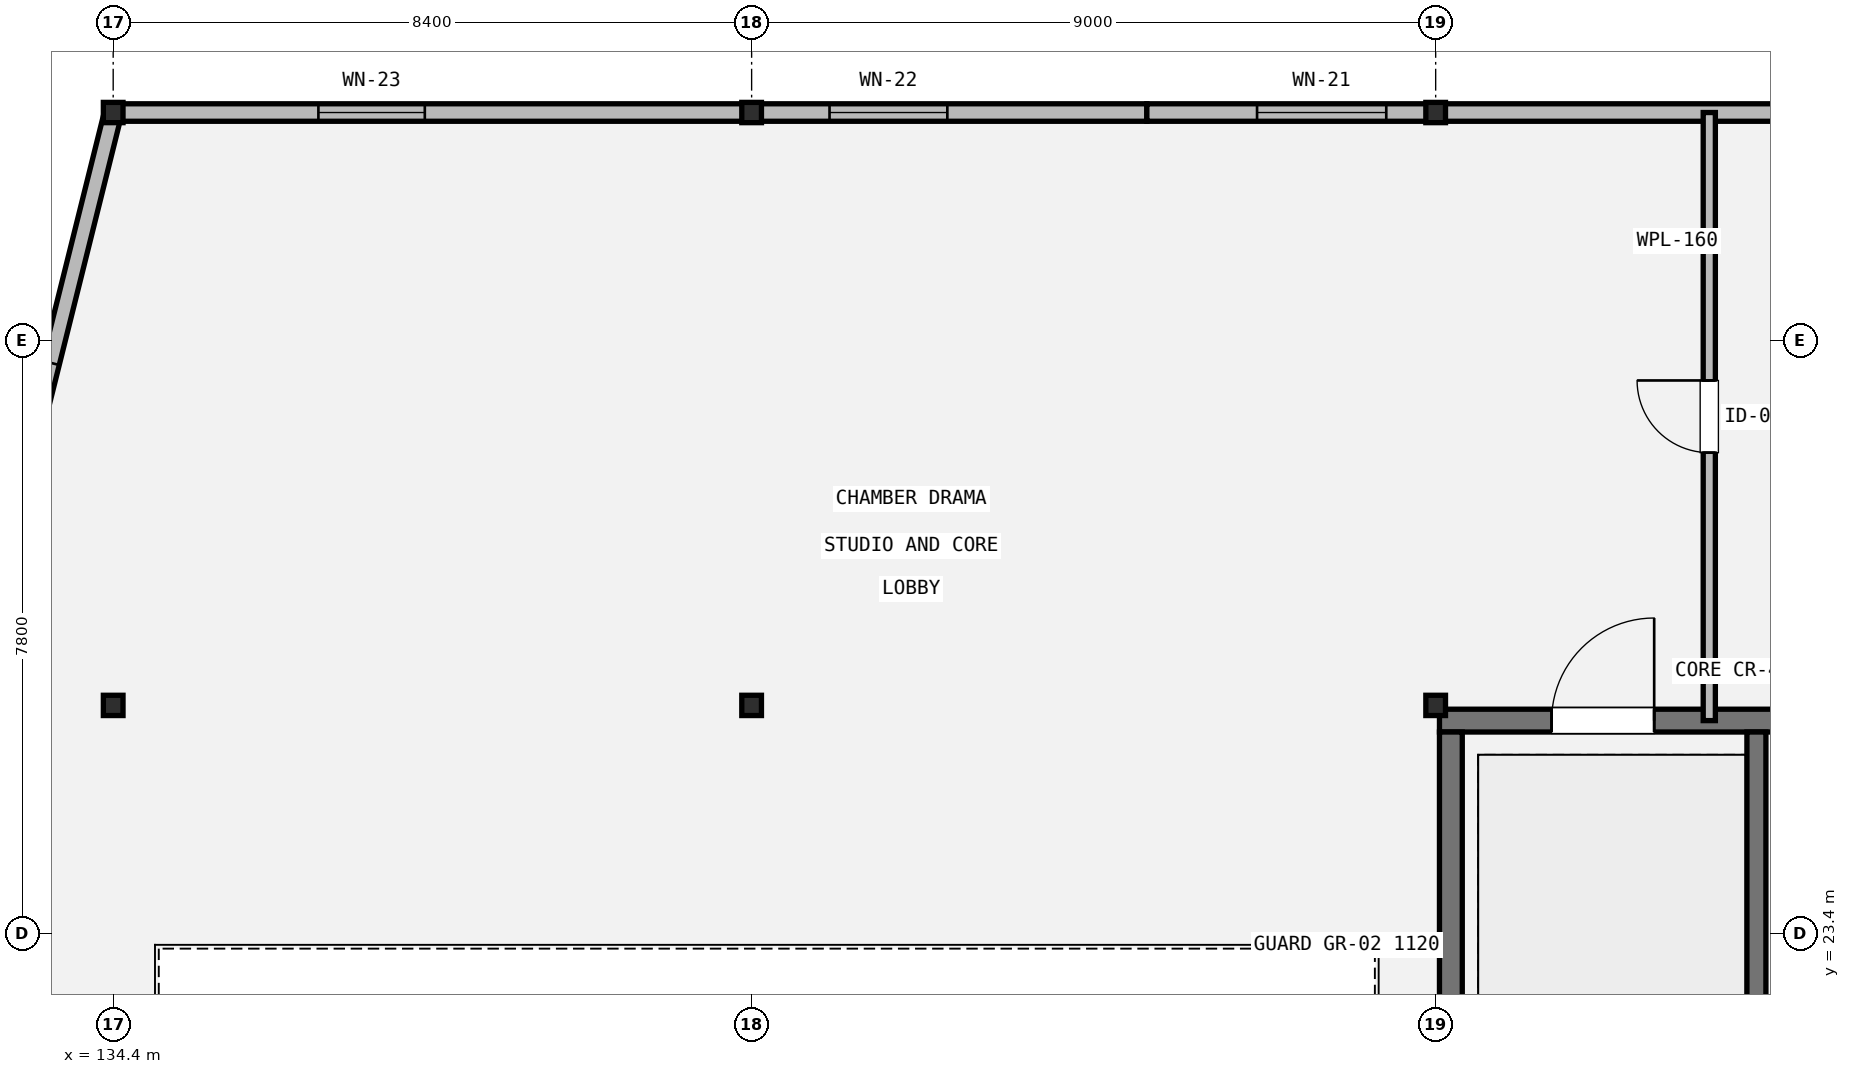
"""IFC4 building model, lengths in metres.
Left out: names, types, materials, properties, quantities, classifications, styles, units other than length and angle.
Written with IfcOpenShell. Run it as: python <this file> out.ifc"""

import sys

from ifc_helpers import new_model, si_unit, direction, frame, frame_2d, origin, origin_2d, place, context, subcontext, project, spatial, rectangle, i_section, extrude, element, fill, save


model = new_model("IFC4")
c1 = context("Model", 3, precision=1e-05, world=origin(), true_north=direction((0.0, 1.0)))
c2 = subcontext(c1, "Body", "Model", "MODEL_VIEW")
j1 = project(units=[si_unit("LENGTHUNIT", "METRE"), si_unit("PLANEANGLEUNIT", "RADIAN")], contexts=[c1])
p1 = place(None, origin())
s1 = spatial("IfcSite", under=j1, at=p1, CompositionType="ELEMENT")
p2 = place(p1, origin())
s2 = spatial("IfcBuilding", under=s1, at=p2, CompositionType="ELEMENT")
p3 = place(p2, frame((0.0, 0.0, 10.2)))
s3 = spatial("IfcBuildingStorey", under=s2, at=p3, CompositionType="ELEMENT", Elevation=10.2)
for number, where, z_axis, x_axis in (
    (1, (134.4, 26.4, 0.0), (0.0, 0.0, 1.0), (1.0, 0.0, 0.0)),
    (2, (134.4, 34.2, 0.0), (0.0, 0.0, 1.0), (1.0, 0.0, 0.0)),
    (3, (142.8, 26.4, 0.0), (0.0, 0.0, 1.0), (1.0, 0.0, 0.0)),
    (4, (142.8, 34.2, 0.0), (0.0, 0.0, 1.0), (1.0, 0.0, 0.0)),
    (5, (151.8, 26.4, 0.0), (0.0, 0.0, 1.0), (1.0, 0.0, 0.0)),
    (6, (151.8, 34.2, 0.0), (0.0, 0.0, 1.0), (1.0, 0.0, 0.0)),
):
    element("IfcColumn", number, at=place(p3, frame(where, z_axis=z_axis, x_axis=x_axis)), inside=s3, PredefinedType="COLUMN", context=c2, shape_type="SweptSolid", body=[
        extrude(i_section(OverallWidth=0.259, OverallDepth=0.267, WebThickness=0.013, FlangeThickness=0.021, FilletRadius=0.013, at=origin_2d()), origin(), (0.0, 0.0, 1.0), 4.8),
    ])
p4 = place(p3, frame((130.51, 18.6, 0.0), z_axis=(0.0, 0.0, 1.0), x_axis=(0.241917443673, 0.970296836255, 0.0)))
e7 = element("IfcWall", 7, at=p4, inside=s3, PredefinedType="STANDARD", context=c2, shape_type="SweptSolid", body=[
    extrude(rectangle(XDim=16.077, YDim=0.23, at=frame_2d((8.039, 0.0))), origin(), (0.0, 0.0, 1.0), 4.032),
])
p5 = place(p4, frame((2.569, 0.0, 0.9)))
e8 = element("IfcOpeningElement", 8, at=p5, cuts=e7, PredefinedType="OPENING", context=c2, shape_type="SweptSolid", body=[
    extrude(rectangle(XDim=1.1, YDim=1.55, at=frame_2d((0.55, 0.775))), frame((0.0, 0.125, 0.0), z_axis=(0.0, -1.0, 0.0), x_axis=(1.0, 0.0, 0.0)), (0.0, 0.0, 1.0), 0.25),
])
p6 = place(p4, frame((11.433, 0.0, 0.9)))
e9 = element("IfcOpeningElement", 9, at=p6, cuts=e7, PredefinedType="OPENING", context=c2, shape_type="SweptSolid", body=[
    extrude(rectangle(XDim=1.25, YDim=1.6, at=frame_2d((0.625, 0.8))), frame((0.0, 0.125, 0.0), z_axis=(0.0, -1.0, 0.0), x_axis=(1.0, 0.0, 0.0)), (0.0, 0.0, 1.0), 0.25),
])
p7 = place(p3, frame((134.4, 34.2, 0.0), z_axis=(0.0, 0.0, 1.0), x_axis=(1.0, 0.0, 0.0)))
e10 = element("IfcWall", 10, at=p7, inside=s3, PredefinedType="STANDARD", context=c2, shape_type="SweptSolid", body=[
    extrude(rectangle(XDim=13.6, YDim=0.23, at=frame_2d((6.8, 0.0))), origin(), (0.0, 0.0, 1.0), 3.889),
])
p8 = place(p7, frame((2.7, 0.0, 0.9)))
e11 = element("IfcOpeningElement", 11, at=p8, cuts=e10, PredefinedType="OPENING", context=c2, shape_type="SweptSolid", body=[
    extrude(rectangle(XDim=1.4, YDim=1.6, at=frame_2d((0.7, 0.8))), frame((0.0, 0.125, 0.0), z_axis=(0.0, -1.0, 0.0), x_axis=(1.0, 0.0, 0.0)), (0.0, 0.0, 1.0), 0.25),
])
p9 = place(p7, frame((9.425, 0.0, 0.9)))
e12 = element("IfcOpeningElement", 12, at=p9, cuts=e10, PredefinedType="OPENING", context=c2, shape_type="SweptSolid", body=[
    extrude(rectangle(XDim=1.55, YDim=1.6, at=frame_2d((0.775, 0.8))), frame((0.0, 0.125, 0.0), z_axis=(0.0, -1.0, 0.0), x_axis=(1.0, 0.0, 0.0)), (0.0, 0.0, 1.0), 0.25),
])
p10 = place(p3, frame((148.0, 34.2, 0.0), z_axis=(0.0, 0.0, 1.0), x_axis=(1.0, 0.0, 0.0)))
e13 = element("IfcWall", 13, at=p10, inside=s3, PredefinedType="STANDARD", context=c2, shape_type="SweptSolid", body=[
    extrude(rectangle(XDim=12.8, YDim=0.23, at=frame_2d((6.4, 0.0))), origin(), (0.0, 0.0, 1.0), 3.889),
])
p11 = place(p10, frame((1.45, 0.0, 0.9)))
e14 = element("IfcOpeningElement", 14, at=p11, cuts=e13, PredefinedType="OPENING", context=c2, shape_type="SweptSolid", body=[
    extrude(rectangle(XDim=1.7, YDim=1.6, at=frame_2d((0.85, 0.8))), frame((0.0, 0.125, 0.0), z_axis=(0.0, -1.0, 0.0), x_axis=(1.0, 0.0, 0.0)), (0.0, 0.0, 1.0), 0.25),
])
p12 = place(p10, frame((8.75, 0.0, 0.9)))
e15 = element("IfcOpeningElement", 15, at=p12, cuts=e13, PredefinedType="OPENING", context=c2, shape_type="SweptSolid", body=[
    extrude(rectangle(XDim=1.7, YDim=1.95, at=frame_2d((0.85, 0.975))), frame((0.0, 0.125, 0.0), z_axis=(0.0, -1.0, 0.0), x_axis=(1.0, 0.0, 0.0)), (0.0, 0.0, 1.0), 0.25),
])
p13 = place(p3, frame((151.85, 26.2, 0.0), z_axis=(0.0, 0.0, 1.0), x_axis=(1.0, 0.0, 0.0)))
e16 = element("IfcWall", 16, at=p13, inside=s3, PredefinedType="SHEAR", context=c2, shape_type="SweptSolid", body=[
    extrude(rectangle(XDim=8.95, YDim=0.3, at=frame_2d((4.475, 0.0))), origin(), (0.0, 0.0, 1.0), 4.6),
])
p14 = place(p13, frame((1.475, 0.0, 0.0)))
e17 = element("IfcOpeningElement", 17, at=p14, cuts=e16, PredefinedType="OPENING", context=c2, shape_type="SweptSolid", body=[
    extrude(rectangle(XDim=1.35, YDim=2.15, at=frame_2d((0.675, 1.075))), frame((0.0, 0.16, 0.0), z_axis=(0.0, -1.0, 0.0), x_axis=(1.0, 0.0, 0.0)), (0.0, 0.0, 1.0), 0.32),
])
p15 = place(p3, frame((152.0, 15.75, 0.0), z_axis=(0.0, 0.0, 1.0), x_axis=(0.0, 1.0, 0.0)))
e18 = element("IfcWall", 18, at=p15, inside=s3, PredefinedType="SHEAR", context=c2, shape_type="SweptSolid", body=[
    extrude(rectangle(XDim=10.3, YDim=0.3, at=frame_2d((5.15, 0.0))), origin(), (0.0, 0.0, 1.0), 4.6),
])
p16 = place(p3, frame((156.02, 26.05, 0.0), z_axis=(0.0, 0.0, 1.0), x_axis=(0.0, -1.0, 0.0)))
e19 = element("IfcWall", 19, at=p16, inside=s3, PredefinedType="SHEAR", context=c2, shape_type="SweptSolid", body=[
    extrude(rectangle(XDim=10.3, YDim=0.25, at=frame_2d((5.15, 0.0))), origin(), (0.0, 0.0, 1.0), 4.6),
])
p17 = place(p16, frame((8.65, 0.0, 0.0)))
e20 = element("IfcOpeningElement", 20, at=p17, cuts=e19, PredefinedType="OPENING", context=c2, shape_type="SweptSolid", body=[
    extrude(rectangle(XDim=1.1, YDim=2.15, at=frame_2d((0.55, 1.075))), frame((0.0, 0.135, 0.0), z_axis=(0.0, -1.0, 0.0), x_axis=(1.0, 0.0, 0.0)), (0.0, 0.0, 1.0), 0.27),
])
p18 = place(p3, frame((155.4, 26.2, 0.0), z_axis=(0.0, 0.0, 1.0), x_axis=(0.0, 1.0, 0.0)))
e21 = element("IfcWall", 21, at=p18, inside=s3, PredefinedType="PLUMBINGWALL", context=c2, shape_type="SweptSolid", body=[
    extrude(rectangle(XDim=8.0, YDim=0.16, at=frame_2d((4.0, 0.0))), origin(), (0.0, 0.0, 1.0), 3.889),
])
p19 = place(p18, frame((3.525, 0.0, 0.0)))
e22 = element("IfcOpeningElement", 22, at=p19, cuts=e21, PredefinedType="OPENING", context=c2, shape_type="SweptSolid", body=[
    extrude(rectangle(XDim=0.95, YDim=2.1, at=frame_2d((0.475, 1.05))), frame((0.0, 0.09, 0.0), z_axis=(0.0, -1.0, 0.0), x_axis=(1.0, 0.0, 0.0)), (0.0, 0.0, 1.0), 0.18),
])
p20 = place(p6, origin())
e23 = element("IfcWindow", 23, at=p20, inside=s3, PartitioningType="SINGLE_PANEL", PredefinedType="WINDOW", context=c2, shape_type="SweptSolid", body=[
    extrude(rectangle(XDim=1.25, YDim=1.6, at=frame_2d((0.625, 0.8))), frame((0.0, 0.03, 0.0), z_axis=(0.0, -1.0, 0.0), x_axis=(1.0, 0.0, 0.0)), (0.0, 0.0, 1.0), 0.06),
])
fill(e9, e23)
p21 = place(p8, origin())
e24 = element("IfcWindow", 24, at=p21, inside=s3, PartitioningType="SINGLE_PANEL", PredefinedType="WINDOW", context=c2, shape_type="SweptSolid", body=[
    extrude(rectangle(XDim=1.4, YDim=1.6, at=frame_2d((0.7, 0.8))), frame((0.0, 0.03, 0.0), z_axis=(0.0, -1.0, 0.0), x_axis=(1.0, 0.0, 0.0)), (0.0, 0.0, 1.0), 0.06),
])
fill(e11, e24)
p22 = place(p9, origin())
e25 = element("IfcWindow", 25, at=p22, inside=s3, PartitioningType="SINGLE_PANEL", PredefinedType="WINDOW", context=c2, shape_type="SweptSolid", body=[
    extrude(rectangle(XDim=1.55, YDim=1.6, at=frame_2d((0.775, 0.8))), frame((0.0, 0.03, 0.0), z_axis=(0.0, -1.0, 0.0), x_axis=(1.0, 0.0, 0.0)), (0.0, 0.0, 1.0), 0.06),
])
fill(e12, e25)
p23 = place(p11, origin())
e26 = element("IfcWindow", 26, at=p23, inside=s3, PartitioningType="SINGLE_PANEL", PredefinedType="WINDOW", context=c2, shape_type="SweptSolid", body=[
    extrude(rectangle(XDim=1.7, YDim=1.6, at=frame_2d((0.85, 0.8))), frame((0.0, 0.03, 0.0), z_axis=(0.0, -1.0, 0.0), x_axis=(1.0, 0.0, 0.0)), (0.0, 0.0, 1.0), 0.06),
])
fill(e14, e26)
p24 = place(p14, origin())
e27 = element("IfcDoor", 27, at=p24, inside=s3, OperationType="SINGLE_SWING_RIGHT", PredefinedType="DOOR", context=c2, shape_type="SweptSolid", body=[
    extrude(rectangle(XDim=1.35, YDim=2.15, at=frame_2d((0.675, 1.075))), frame((0.0, 0.025, 0.0), z_axis=(0.0, -1.0, 0.0), x_axis=(1.0, 0.0, 0.0)), (0.0, 0.0, 1.0), 0.05),
])
fill(e17, e27)
p25 = place(p19, origin())
e28 = element("IfcDoor", 28, at=p25, inside=s3, OperationType="SINGLE_SWING_RIGHT", PredefinedType="DOOR", context=c2, shape_type="SweptSolid", body=[
    extrude(rectangle(XDim=0.95, YDim=2.1, at=frame_2d((0.475, 1.05))), frame((0.0, 0.025, 0.0), z_axis=(0.0, -1.0, 0.0), x_axis=(1.0, 0.0, 0.0)), (0.0, 0.0, 1.0), 0.05),
])
fill(e22, e28)
save(model, sys.argv[1])
